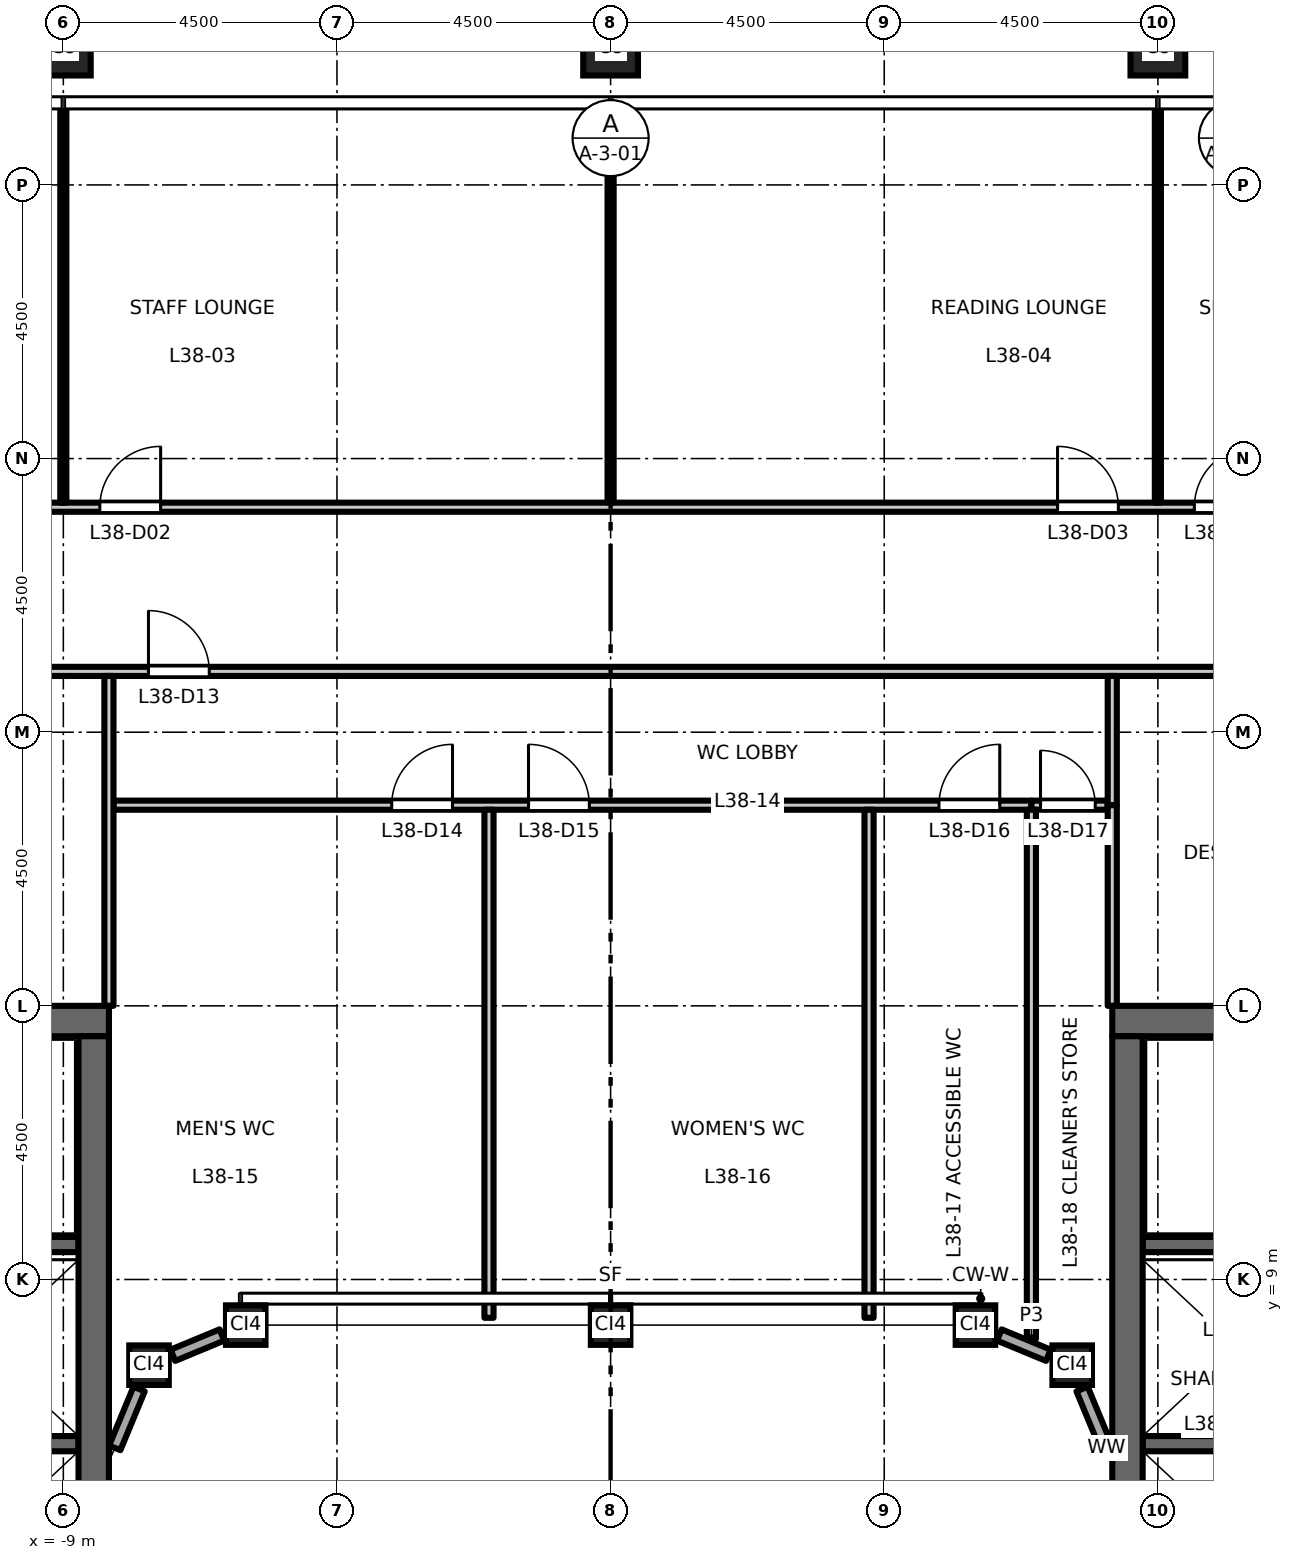
"""IFC4 building model, lengths in metres.
Left out: names, types, materials, properties, quantities, classifications, styles, units other than length and angle.
Written with IfcOpenShell. Run it as: python <this file> out.ifc"""

import sys

from ifc_helpers import new_model, si_unit, direction, frame, frame_2d, origin, origin_2d, place, context, subcontext, project, spatial, rectangle, hollow_rectangle, extrude, element, fill, save


model = new_model("IFC4")
c1 = context("Model", 3, precision=1e-05, world=origin(), true_north=direction((0.0, 1.0)))
c2 = subcontext(c1, "Body", "Model", "MODEL_VIEW")
j1 = project(units=[si_unit("LENGTHUNIT", "METRE"), si_unit("PLANEANGLEUNIT", "RADIAN")], contexts=[c1])
p1 = place(None, origin())
s1 = spatial("IfcSite", under=j1, at=p1, CompositionType="ELEMENT")
p2 = place(p1, origin())
s2 = spatial("IfcBuilding", under=s1, at=p2, CompositionType="ELEMENT")
p3 = place(p2, frame((0.0, 0.0, 176.7)))
s3 = spatial("IfcBuildingStorey", under=s2, at=p3, CompositionType="ELEMENT", Elevation=176.7)
for number, where, z_axis, x_axis in (
    (1, (9.0, 29.25, 0.0), (0.0, 0.0, 1.0), (1.0, 0.0, 0.0)),
    (2, (0.0, 29.25, 0.0), (0.0, 0.0, 1.0), (1.0, 0.0, 0.0)),
    (3, (-9.0, 29.25, 0.0), (0.0, 0.0, 1.0), (1.0, 0.0, 0.0)),
):
    element("IfcColumn", number, at=place(p3, frame(where, z_axis=z_axis, x_axis=x_axis)), inside=s3, PredefinedType="COLUMN", context=c2, shape_type="SweptSolid", body=[
        extrude(hollow_rectangle(XDim=0.9, YDim=0.9, WallThickness=0.05, at=origin_2d()), origin(), (0.0, 0.0, 1.0), 4.5),
    ])
for number, where, z_axis, x_axis in (
    (4, (-7.591, 7.591, 0.0), (0.0, 0.0, 1.0), (1.0, 0.0, 0.0)),
    (5, (-6.0, 8.25, 0.0), (0.0, 0.0, 1.0), (1.0, 0.0, 0.0)),
    (6, (0.0, 8.25, 0.0), (0.0, 0.0, 1.0), (1.0, 0.0, 0.0)),
    (7, (6.0, 8.25, 0.0), (0.0, 0.0, 1.0), (1.0, 0.0, 0.0)),
    (8, (7.591, 7.591, 0.0), (0.0, 0.0, 1.0), (1.0, 0.0, 0.0)),
):
    element("IfcColumn", number, at=place(p3, frame(where, z_axis=z_axis, x_axis=x_axis)), inside=s3, PredefinedType="COLUMN", context=c2, shape_type="SweptSolid", body=[
        extrude(hollow_rectangle(XDim=0.65, YDim=0.65, WallThickness=0.036, at=origin_2d()), origin(), (0.0, 0.0, 1.0), 4.5),
    ])
p4 = place(p3, frame((-8.75, 6.3, 0.0), z_axis=(0.0, 0.0, 1.0), x_axis=(-1.0, 0.0, 0.0)))
e9 = element("IfcWall", 9, at=p4, inside=s3, PredefinedType="SHEAR", context=c2, shape_type="SweptSolid", body=[
    extrude(rectangle(XDim=3.1, YDim=0.25, at=frame_2d((1.55, 0.0))), origin(), (0.0, 0.0, 1.0), 4.3),
])
p5 = place(p3, frame((-8.75, 9.575, 0.0), z_axis=(0.0, 0.0, 1.0), x_axis=(-1.0, 0.0, 0.0)))
e10 = element("IfcWall", 10, at=p5, inside=s3, PredefinedType="SHEAR", context=c2, shape_type="SweptSolid", body=[
    extrude(rectangle(XDim=8.0, YDim=0.25, at=frame_2d((4.0, 0.0))), origin(), (0.0, 0.0, 1.0), 4.3),
])
p6 = place(p5, frame((6.65, 0.0, 0.0)))
e11 = element("IfcOpeningElement", 11, at=p6, cuts=e10, PredefinedType="OPENING", context=c2, shape_type="SweptSolid", body=[
    extrude(rectangle(XDim=1.1, YDim=2.1, at=frame_2d((0.55, 1.05))), frame((0.0, 0.135, 0.0), z_axis=(0.0, -1.0, 0.0), x_axis=(1.0, 0.0, 0.0)), (0.0, 0.0, 1.0), 0.27),
])
p7 = place(p3, frame((-8.25, 13.25, 0.0), z_axis=(0.0, 0.0, 1.0), x_axis=(-1.0, 0.0, 0.0)))
e12 = element("IfcWall", 12, at=p7, inside=s3, PredefinedType="SHEAR", context=c2, shape_type="SweptSolid", body=[
    extrude(rectangle(XDim=13.5, YDim=0.5, at=frame_2d((6.75, 0.0))), origin(), (0.0, 0.0, 1.0), 4.3),
])
p8 = place(p3, frame((-8.5, -13.0, 0.0), z_axis=(0.0, 0.0, 1.0), x_axis=(0.0, 1.0, 0.0)))
e13 = element("IfcWall", 13, at=p8, inside=s3, PredefinedType="SHEAR", context=c2, shape_type="SweptSolid", body=[
    extrude(rectangle(XDim=26.0, YDim=0.5, at=frame_2d((13.0, 0.0))), origin(), (0.0, 0.0, 1.0), 4.3),
])
p9 = place(p3, frame((8.75, 6.3, 0.0), z_axis=(0.0, 0.0, 1.0), x_axis=(1.0, 0.0, 0.0)))
e14 = element("IfcWall", 14, at=p9, inside=s3, PredefinedType="SHEAR", context=c2, shape_type="SweptSolid", body=[
    extrude(rectangle(XDim=3.1, YDim=0.25, at=frame_2d((1.55, 0.0))), origin(), (0.0, 0.0, 1.0), 4.3),
])
p10 = place(p3, frame((8.75, 9.575, 0.0), z_axis=(0.0, 0.0, 1.0), x_axis=(1.0, 0.0, 0.0)))
e15 = element("IfcWall", 15, at=p10, inside=s3, PredefinedType="SHEAR", context=c2, shape_type="SweptSolid", body=[
    extrude(rectangle(XDim=8.0, YDim=0.25, at=frame_2d((4.0, 0.0))), origin(), (0.0, 0.0, 1.0), 4.3),
])
p11 = place(p10, frame((6.65, 0.0, 0.0)))
e16 = element("IfcOpeningElement", 16, at=p11, cuts=e15, PredefinedType="OPENING", context=c2, shape_type="SweptSolid", body=[
    extrude(rectangle(XDim=1.1, YDim=2.1, at=frame_2d((0.55, 1.05))), frame((0.0, 0.135, 0.0), z_axis=(0.0, -1.0, 0.0), x_axis=(1.0, 0.0, 0.0)), (0.0, 0.0, 1.0), 0.27),
])
p12 = place(p3, frame((8.25, 13.25, 0.0), z_axis=(0.0, 0.0, 1.0), x_axis=(1.0, 0.0, 0.0)))
e17 = element("IfcWall", 17, at=p12, inside=s3, PredefinedType="SHEAR", context=c2, shape_type="SweptSolid", body=[
    extrude(rectangle(XDim=13.5, YDim=0.5, at=frame_2d((6.75, 0.0))), origin(), (0.0, 0.0, 1.0), 4.3),
])
p13 = place(p3, frame((8.5, -13.0, 0.0), z_axis=(0.0, 0.0, 1.0), x_axis=(0.0, 1.0, 0.0)))
e18 = element("IfcWall", 18, at=p13, inside=s3, PredefinedType="SHEAR", context=c2, shape_type="SweptSolid", body=[
    extrude(rectangle(XDim=26.0, YDim=0.5, at=frame_2d((13.0, 0.0))), origin(), (0.0, 0.0, 1.0), 4.3),
])
p14 = place(p3, frame((8.154, 6.231, 0.0), z_axis=(0.0, 0.0, 1.0), x_axis=(-0.382694858887, 0.923874799408, 0.0)))
e19 = element("IfcWall", 19, at=p14, inside=s3, PredefinedType="STANDARD", context=c2, shape_type="SweptSolid", body=[
    extrude(rectangle(XDim=1.048, YDim=0.2, at=frame_2d((0.524, 0.0))), origin(), (0.0, 0.0, 1.0), 3.776),
])
for number, where, z_axis, x_axis in (
    (20, (7.199, 7.753, 0.0), (0.0, 0.0, 1.0), (-0.924, 0.383, 0.0)),
    (21, (-6.392, 8.087, 0.0), (0.0, 0.0, 1.0), (-0.924, -0.383, 0.0)),
):
    element("IfcWall", number, at=place(p3, frame(where, z_axis=z_axis, x_axis=x_axis)), inside=s3, PredefinedType="STANDARD", context=c2, shape_type="SweptSolid", body=[
        extrude(rectangle(XDim=0.873, YDim=0.2, at=frame_2d((0.437, 0.0))), origin(), (0.0, 0.0, 1.0), 3.776),
    ])
p15 = place(p3, frame((-7.753, 7.199, 0.0), z_axis=(0.0, 0.0, 1.0), x_axis=(-0.382694858887, -0.923874799408, 0.0)))
e22 = element("IfcWall", 22, at=p15, inside=s3, PredefinedType="STANDARD", context=c2, shape_type="SweptSolid", body=[
    extrude(rectangle(XDim=1.048, YDim=0.2, at=frame_2d((0.524, 0.0))), origin(), (0.0, 0.0, 1.0), 3.776),
])
p16 = place(p3, frame((-8.175, 16.8, 0.0), z_axis=(0.0, 0.0, 1.0), x_axis=(1.0, 0.0, 0.0)))
e23 = element("IfcWall", 23, at=p16, inside=s3, PredefinedType="PARTITIONING", context=c2, shape_type="SweptSolid", body=[
    extrude(rectangle(XDim=15.095, YDim=0.15, at=frame_2d((7.547, 0.0))), origin(), (0.0, 0.0, 1.0), 4.3),
])
p17 = place(p16, frame((4.575, 0.0, 0.0)))
e24 = element("IfcOpeningElement", 24, at=p17, cuts=e23, PredefinedType="OPENING", context=c2, shape_type="SweptSolid", body=[
    extrude(rectangle(XDim=1.0, YDim=2.1, at=frame_2d((0.5, 1.05))), frame((0.0, 0.085, 0.0), z_axis=(0.0, -1.0, 0.0), x_axis=(1.0, 0.0, 0.0)), (0.0, 0.0, 1.0), 0.17),
])
p18 = place(p16, frame((6.825, 0.0, 0.0)))
e25 = element("IfcOpeningElement", 25, at=p18, cuts=e23, PredefinedType="OPENING", context=c2, shape_type="SweptSolid", body=[
    extrude(rectangle(XDim=1.0, YDim=2.1, at=frame_2d((0.5, 1.05))), frame((0.0, 0.085, 0.0), z_axis=(0.0, -1.0, 0.0), x_axis=(1.0, 0.0, 0.0)), (0.0, 0.0, 1.0), 0.17),
])
p19 = place(p16, frame((13.575, 0.0, 0.0)))
e26 = element("IfcOpeningElement", 26, at=p19, cuts=e23, PredefinedType="OPENING", context=c2, shape_type="SweptSolid", body=[
    extrude(rectangle(XDim=1.0, YDim=2.1, at=frame_2d((0.5, 1.05))), frame((0.0, 0.085, 0.0), z_axis=(0.0, -1.0, 0.0), x_axis=(1.0, 0.0, 0.0)), (0.0, 0.0, 1.0), 0.17),
])
p20 = place(p3, frame((6.92, 16.8, 0.0), z_axis=(0.0, 0.0, 1.0), x_axis=(1.0, 0.0, 0.0)))
e27 = element("IfcWall", 27, at=p20, inside=s3, PredefinedType="PARTITIONING", context=c2, shape_type="SweptSolid", body=[
    extrude(rectangle(XDim=1.255, YDim=0.15, at=frame_2d((0.627, 0.0))), origin(), (0.0, 0.0, 1.0), 4.3),
])
p21 = place(p20, frame((0.15, 0.0, 0.0)))
e28 = element("IfcOpeningElement", 28, at=p21, cuts=e27, PredefinedType="OPENING", context=c2, shape_type="SweptSolid", body=[
    extrude(rectangle(XDim=0.9, YDim=2.1, at=frame_2d((0.45, 1.05))), frame((0.0, 0.085, 0.0), z_axis=(0.0, -1.0, 0.0), x_axis=(1.0, 0.0, 0.0)), (0.0, 0.0, 1.0), 0.17),
])
p22 = place(p3, frame((-21.825, 19.0, 0.0), z_axis=(0.0, 0.0, 1.0), x_axis=(1.0, 0.0, 0.0)))
e29 = element("IfcWall", 29, at=p22, inside=s3, PredefinedType="PARTITIONING", context=c2, shape_type="SweptSolid", body=[
    extrude(rectangle(XDim=43.65, YDim=0.15, at=frame_2d((21.825, 0.0))), origin(), (0.0, 0.0, 1.0), 4.3),
])
p23 = place(p22, frame((14.225, 0.0, 0.0)))
e30 = element("IfcOpeningElement", 30, at=p23, cuts=e29, PredefinedType="OPENING", context=c2, shape_type="SweptSolid", body=[
    extrude(rectangle(XDim=1.0, YDim=2.1, at=frame_2d((0.5, 1.05))), frame((0.0, 0.085, 0.0), z_axis=(0.0, -1.0, 0.0), x_axis=(1.0, 0.0, 0.0)), (0.0, 0.0, 1.0), 0.17),
])
p24 = place(p22, frame((0.725, 0.0, 0.0)))
e31 = element("IfcOpeningElement", 31, at=p24, cuts=e29, PredefinedType="OPENING", context=c2, shape_type="SweptSolid", body=[
    extrude(rectangle(XDim=1.0, YDim=2.1, at=frame_2d((0.5, 1.05))), frame((0.0, 0.085, 0.0), z_axis=(0.0, -1.0, 0.0), x_axis=(1.0, 0.0, 0.0)), (0.0, 0.0, 1.0), 0.17),
])
p25 = place(p22, frame((41.975, 0.0, 0.0)))
e32 = element("IfcOpeningElement", 32, at=p25, cuts=e29, PredefinedType="OPENING", context=c2, shape_type="SweptSolid", body=[
    extrude(rectangle(XDim=1.0, YDim=2.1, at=frame_2d((0.5, 1.05))), frame((0.0, 0.085, 0.0), z_axis=(0.0, -1.0, 0.0), x_axis=(1.0, 0.0, 0.0)), (0.0, 0.0, 1.0), 0.17),
])
p26 = place(p3, frame((-26.646, 21.7, 0.0), z_axis=(0.0, 0.0, 1.0), x_axis=(1.0, 0.0, 0.0)))
e33 = element("IfcWall", 33, at=p26, inside=s3, PredefinedType="PARTITIONING", context=c2, shape_type="SweptSolid", body=[
    extrude(rectangle(XDim=53.292, YDim=0.15, at=frame_2d((26.646, 0.0))), origin(), (0.0, 0.0, 1.0), 4.3),
])
p27 = place(p26, frame((15.996, 0.0, 0.0)))
e34 = element("IfcOpeningElement", 34, at=p27, cuts=e33, PredefinedType="OPENING", context=c2, shape_type="SweptSolid", body=[
    extrude(rectangle(XDim=1.0, YDim=2.1, at=frame_2d((0.5, 1.05))), frame((0.0, 0.085, 0.0), z_axis=(0.0, -1.0, 0.0), x_axis=(1.0, 0.0, 0.0)), (0.0, 0.0, 1.0), 0.17),
])
p28 = place(p26, frame((18.246, 0.0, 0.0)))
e35 = element("IfcOpeningElement", 35, at=p28, cuts=e33, PredefinedType="OPENING", context=c2, shape_type="SweptSolid", body=[
    extrude(rectangle(XDim=1.0, YDim=2.1, at=frame_2d((0.5, 1.05))), frame((0.0, 0.085, 0.0), z_axis=(0.0, -1.0, 0.0), x_axis=(1.0, 0.0, 0.0)), (0.0, 0.0, 1.0), 0.17),
])
p29 = place(p26, frame((33.996, 0.0, 0.0)))
e36 = element("IfcOpeningElement", 36, at=p29, cuts=e33, PredefinedType="OPENING", context=c2, shape_type="SweptSolid", body=[
    extrude(rectangle(XDim=1.0, YDim=2.1, at=frame_2d((0.5, 1.05))), frame((0.0, 0.085, 0.0), z_axis=(0.0, -1.0, 0.0), x_axis=(1.0, 0.0, 0.0)), (0.0, 0.0, 1.0), 0.17),
])
p30 = place(p26, frame((36.246, 0.0, 0.0)))
e37 = element("IfcOpeningElement", 37, at=p30, cuts=e33, PredefinedType="OPENING", context=c2, shape_type="SweptSolid", body=[
    extrude(rectangle(XDim=1.0, YDim=2.1, at=frame_2d((0.5, 1.05))), frame((0.0, 0.085, 0.0), z_axis=(0.0, -1.0, 0.0), x_axis=(1.0, 0.0, 0.0)), (0.0, 0.0, 1.0), 0.17),
])
p31 = place(p26, frame((6.996, 0.0, 0.0)))
e38 = element("IfcOpeningElement", 38, at=p31, cuts=e33, PredefinedType="OPENING", context=c2, shape_type="SweptSolid", body=[
    extrude(rectangle(XDim=1.0, YDim=2.1, at=frame_2d((0.5, 1.05))), frame((0.0, 0.085, 0.0), z_axis=(0.0, -1.0, 0.0), x_axis=(1.0, 0.0, 0.0)), (0.0, 0.0, 1.0), 0.17),
])
p32 = place(p26, frame((45.142, 0.0, 0.0)))
e39 = element("IfcOpeningElement", 39, at=p32, cuts=e33, PredefinedType="OPENING", context=c2, shape_type="SweptSolid", body=[
    extrude(rectangle(XDim=1.0, YDim=2.1, at=frame_2d((0.5, 1.05))), frame((0.0, 0.085, 0.0), z_axis=(0.0, -1.0, 0.0), x_axis=(1.0, 0.0, 0.0)), (0.0, 0.0, 1.0), 0.17),
])
p33 = place(p3, frame((-9.0, 21.775, 0.0), z_axis=(0.0, 0.0, 1.0), x_axis=(0.0, 1.0, 0.0)))
e40 = element("IfcWall", 40, at=p33, inside=s3, PredefinedType="PARTITIONING", context=c2, shape_type="SweptSolid", body=[
    extrude(rectangle(XDim=6.485, YDim=0.1, at=frame_2d((3.243, 0.0))), origin(), (0.0, 0.0, 1.0), 3.4),
])
p34 = place(p3, frame((-8.25, 13.5, 0.0), z_axis=(0.0, 0.0, 1.0), x_axis=(0.0, 1.0, 0.0)))
e41 = element("IfcWall", 41, at=p34, inside=s3, PredefinedType="PARTITIONING", context=c2, shape_type="SweptSolid", body=[
    extrude(rectangle(XDim=5.425, YDim=0.15, at=frame_2d((2.712, 0.0))), origin(), (0.0, 0.0, 1.0), 4.3),
])
p35 = place(p3, frame((-2.0, 8.37, 0.0), z_axis=(0.0, 0.0, 1.0), x_axis=(0.0, 1.0, 0.0)))
e42 = element("IfcWall", 42, at=p35, inside=s3, PredefinedType="PARTITIONING", context=c2, shape_type="SweptSolid", body=[
    extrude(rectangle(XDim=8.355, YDim=0.15, at=frame_2d((4.177, 0.0))), origin(), (0.0, 0.0, 1.0), 4.3),
])
p36 = place(p3, frame((0.0, 21.775, 0.0), z_axis=(0.0, 0.0, 1.0), x_axis=(0.0, 1.0, 0.0)))
e43 = element("IfcWall", 43, at=p36, inside=s3, PredefinedType="PARTITIONING", context=c2, shape_type="SweptSolid", body=[
    extrude(rectangle(XDim=6.485, YDim=0.1, at=frame_2d((3.243, 0.0))), origin(), (0.0, 0.0, 1.0), 3.4),
])
p37 = place(p3, frame((4.25, 8.37, 0.0), z_axis=(0.0, 0.0, 1.0), x_axis=(0.0, 1.0, 0.0)))
e44 = element("IfcWall", 44, at=p37, inside=s3, PredefinedType="PARTITIONING", context=c2, shape_type="SweptSolid", body=[
    extrude(rectangle(XDim=8.355, YDim=0.15, at=frame_2d((4.177, 0.0))), origin(), (0.0, 0.0, 1.0), 4.3),
])
p38 = place(p3, frame((6.92, 8.025, 0.0), z_axis=(0.0, 0.0, 1.0), x_axis=(0.0, 1.0, 0.0)))
e45 = element("IfcWall", 45, at=p38, inside=s3, PredefinedType="PARTITIONING", context=c2, shape_type="SweptSolid", body=[
    extrude(rectangle(XDim=8.7, YDim=0.15, at=frame_2d((4.35, 0.0))), origin(), (0.0, 0.0, 1.0), 4.3),
])
p39 = place(p3, frame((8.25, 16.8, 0.0), z_axis=(0.0, 0.0, 1.0), x_axis=(0.0, 1.0, 0.0)))
e46 = element("IfcWall", 46, at=p39, inside=s3, PredefinedType="PARTITIONING", context=c2, shape_type="SweptSolid", body=[
    extrude(rectangle(XDim=2.125, YDim=0.15, at=frame_2d((1.062, 0.0))), origin(), (0.0, 0.0, 1.0), 4.3),
])
p40 = place(p3, frame((8.25, 13.5, 0.0), z_axis=(0.0, 0.0, 1.0), x_axis=(0.0, 1.0, 0.0)))
e47 = element("IfcWall", 47, at=p40, inside=s3, PredefinedType="PARTITIONING", context=c2, shape_type="SweptSolid", body=[
    extrude(rectangle(XDim=3.3, YDim=0.15, at=frame_2d((1.65, 0.0))), origin(), (0.0, 0.0, 1.0), 4.3),
])
p41 = place(p3, frame((9.0, 21.775, 0.0), z_axis=(0.0, 0.0, 1.0), x_axis=(0.0, 1.0, 0.0)))
e48 = element("IfcWall", 48, at=p41, inside=s3, PredefinedType="PARTITIONING", context=c2, shape_type="SweptSolid", body=[
    extrude(rectangle(XDim=6.485, YDim=0.1, at=frame_2d((3.243, 0.0))), origin(), (0.0, 0.0, 1.0), 3.4),
])
p42 = place(p28, origin())
e49 = element("IfcDoor", 49, at=p42, inside=s3, OperationType="SINGLE_SWING_RIGHT", PredefinedType="DOOR", context=c2, shape_type="SweptSolid", body=[
    extrude(rectangle(XDim=1.0, YDim=2.1, at=frame_2d((0.5, 1.05))), frame((0.0, 0.025, 0.0), z_axis=(0.0, -1.0, 0.0), x_axis=(1.0, 0.0, 0.0)), (0.0, 0.0, 1.0), 0.05),
])
fill(e35, e49)
p43 = place(p29, origin())
e50 = element("IfcDoor", 50, at=p43, inside=s3, OperationType="SINGLE_SWING_LEFT", PredefinedType="DOOR", context=c2, shape_type="SweptSolid", body=[
    extrude(rectangle(XDim=1.0, YDim=2.1, at=frame_2d((0.5, 1.05))), frame((0.0, 0.025, 0.0), z_axis=(0.0, -1.0, 0.0), x_axis=(1.0, 0.0, 0.0)), (0.0, 0.0, 1.0), 0.05),
])
fill(e36, e50)
p44 = place(p30, origin())
e51 = element("IfcDoor", 51, at=p44, inside=s3, OperationType="SINGLE_SWING_RIGHT", PredefinedType="DOOR", context=c2, shape_type="SweptSolid", body=[
    extrude(rectangle(XDim=1.0, YDim=2.1, at=frame_2d((0.5, 1.05))), frame((0.0, 0.025, 0.0), z_axis=(0.0, -1.0, 0.0), x_axis=(1.0, 0.0, 0.0)), (0.0, 0.0, 1.0), 0.05),
])
fill(e37, e51)
p45 = place(p23, origin())
e52 = element("IfcDoor", 52, at=p45, inside=s3, OperationType="SINGLE_SWING_LEFT", PredefinedType="DOOR", context=c2, shape_type="SweptSolid", body=[
    extrude(rectangle(XDim=1.0, YDim=2.1, at=frame_2d((0.5, 1.05))), frame((0.0, 0.025, 0.0), z_axis=(0.0, -1.0, 0.0), x_axis=(1.0, 0.0, 0.0)), (0.0, 0.0, 1.0), 0.05),
])
fill(e30, e52)
p46 = place(p17, origin())
e53 = element("IfcDoor", 53, at=p46, inside=s3, OperationType="SINGLE_SWING_RIGHT", PredefinedType="DOOR", context=c2, shape_type="SweptSolid", body=[
    extrude(rectangle(XDim=1.0, YDim=2.1, at=frame_2d((0.5, 1.05))), frame((0.0, 0.025, 0.0), z_axis=(0.0, -1.0, 0.0), x_axis=(1.0, 0.0, 0.0)), (0.0, 0.0, 1.0), 0.05),
])
fill(e24, e53)
p47 = place(p18, origin())
e54 = element("IfcDoor", 54, at=p47, inside=s3, OperationType="SINGLE_SWING_LEFT", PredefinedType="DOOR", context=c2, shape_type="SweptSolid", body=[
    extrude(rectangle(XDim=1.0, YDim=2.1, at=frame_2d((0.5, 1.05))), frame((0.0, 0.025, 0.0), z_axis=(0.0, -1.0, 0.0), x_axis=(1.0, 0.0, 0.0)), (0.0, 0.0, 1.0), 0.05),
])
fill(e25, e54)
p48 = place(p19, origin())
e55 = element("IfcDoor", 55, at=p48, inside=s3, OperationType="SINGLE_SWING_RIGHT", PredefinedType="DOOR", context=c2, shape_type="SweptSolid", body=[
    extrude(rectangle(XDim=1.0, YDim=2.1, at=frame_2d((0.5, 1.05))), frame((0.0, 0.025, 0.0), z_axis=(0.0, -1.0, 0.0), x_axis=(1.0, 0.0, 0.0)), (0.0, 0.0, 1.0), 0.05),
])
fill(e26, e55)
p49 = place(p21, origin())
e56 = element("IfcDoor", 56, at=p49, inside=s3, OperationType="SINGLE_SWING_LEFT", PredefinedType="DOOR", context=c2, shape_type="SweptSolid", body=[
    extrude(rectangle(XDim=0.9, YDim=2.1, at=frame_2d((0.45, 1.05))), frame((0.0, 0.025, 0.0), z_axis=(0.0, -1.0, 0.0), x_axis=(1.0, 0.0, 0.0)), (0.0, 0.0, 1.0), 0.05),
])
fill(e28, e56)
save(model, sys.argv[1])
